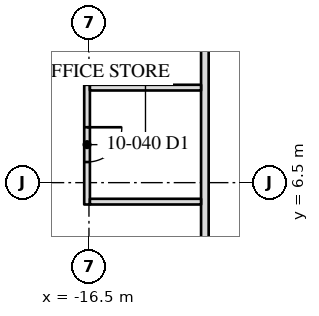
"""IFC4 building model, lengths in metres.
Left out: names, types, materials, properties, quantities, classifications, styles, units other than length and angle.
Written with IfcOpenShell. Run it as: python <this file> out.ifc"""

import sys

from ifc_helpers import new_model, si_unit, direction, frame, frame_2d, origin, place, context, subcontext, project, spatial, rectangle, extrude, element, fill, save


model = new_model("IFC4")
c1 = context("Model", 3, precision=1e-05, world=origin(), true_north=direction((0.0, 1.0)))
c2 = subcontext(c1, "Body", "Model", "MODEL_VIEW")
j1 = project(units=[si_unit("LENGTHUNIT", "METRE"), si_unit("PLANEANGLEUNIT", "RADIAN")], contexts=[c1])
p1 = place(None, origin())
s1 = spatial("IfcSite", under=j1, at=p1, CompositionType="ELEMENT")
p2 = place(p1, origin())
s2 = spatial("IfcBuilding", under=s1, at=p2, CompositionType="ELEMENT")
p3 = place(p2, frame((0.0, 0.0, 44.7)))
s3 = spatial("IfcBuildingStorey", under=s2, at=p3, CompositionType="ELEMENT", Elevation=44.7)
p4 = place(p3, frame((-13.45, 13.55, 0.0), z_axis=(0.0, 0.0, 1.0), x_axis=(0.0, -1.0, 0.0)))
e1 = element("IfcWall", 1, at=p4, inside=s3, PredefinedType="PARTITIONING", context=c2, shape_type="SweptSolid", body=[
    extrude(rectangle(XDim=26.9, YDim=0.2, at=frame_2d((13.45, 0.0))), origin(), (0.0, 0.0, 1.0), 3.91),
])
p5 = place(p3, frame((-16.55, 9.075, 0.0), z_axis=(0.0, 0.0, 1.0), x_axis=(0.0, -1.0, 0.0)))
e2 = element("IfcWall", 2, at=p5, inside=s3, PredefinedType="PARTITIONING", context=c2, shape_type="SweptSolid", body=[
    extrude(rectangle(XDim=3.15, YDim=0.15, at=frame_2d((1.575, 0.0))), origin(), (0.0, 0.0, 1.0), 3.91),
])
p6 = place(p5, frame((1.117, 0.0, 0.0)))
e3 = element("IfcOpeningElement", 3, at=p6, cuts=e2, PredefinedType="OPENING", context=c2, shape_type="SweptSolid", body=[
    extrude(rectangle(XDim=0.915, YDim=2.134, at=frame_2d((0.458, 1.067))), frame((0.0, 0.085, 0.0), z_axis=(0.0, -1.0, 0.0), x_axis=(1.0, 0.0, 0.0)), (0.0, 0.0, 1.0), 0.17),
])
for number, where, z_axis, x_axis in (
    (4, (-16.475, 9.0, 0.0), (0.0, 0.0, 1.0), (1.0, 0.0, 0.0)),
    (5, (-16.475, 6.0, 0.0), (0.0, 0.0, 1.0), (1.0, 0.0, 0.0)),
):
    element("IfcWall", number, at=place(p3, frame(where, z_axis=z_axis, x_axis=x_axis)), inside=s3, PredefinedType="PARTITIONING", context=c2, shape_type="SweptSolid", body=[
        extrude(rectangle(XDim=2.925, YDim=0.15, at=frame_2d((1.462, 0.0))), origin(), (0.0, 0.0, 1.0), 3.91),
    ])
p7 = place(p6, origin())
e6 = element("IfcDoor", 6, at=p7, inside=s3, OperationType="SINGLE_SWING_LEFT", PredefinedType="DOOR", context=c2, shape_type="SweptSolid", body=[
    extrude(rectangle(XDim=0.915, YDim=2.134, at=frame_2d((0.458, 1.067))), frame((0.0, 0.025, 0.0), z_axis=(0.0, -1.0, 0.0), x_axis=(1.0, 0.0, 0.0)), (0.0, 0.0, 1.0), 0.05),
])
fill(e3, e6)
save(model, sys.argv[1])
